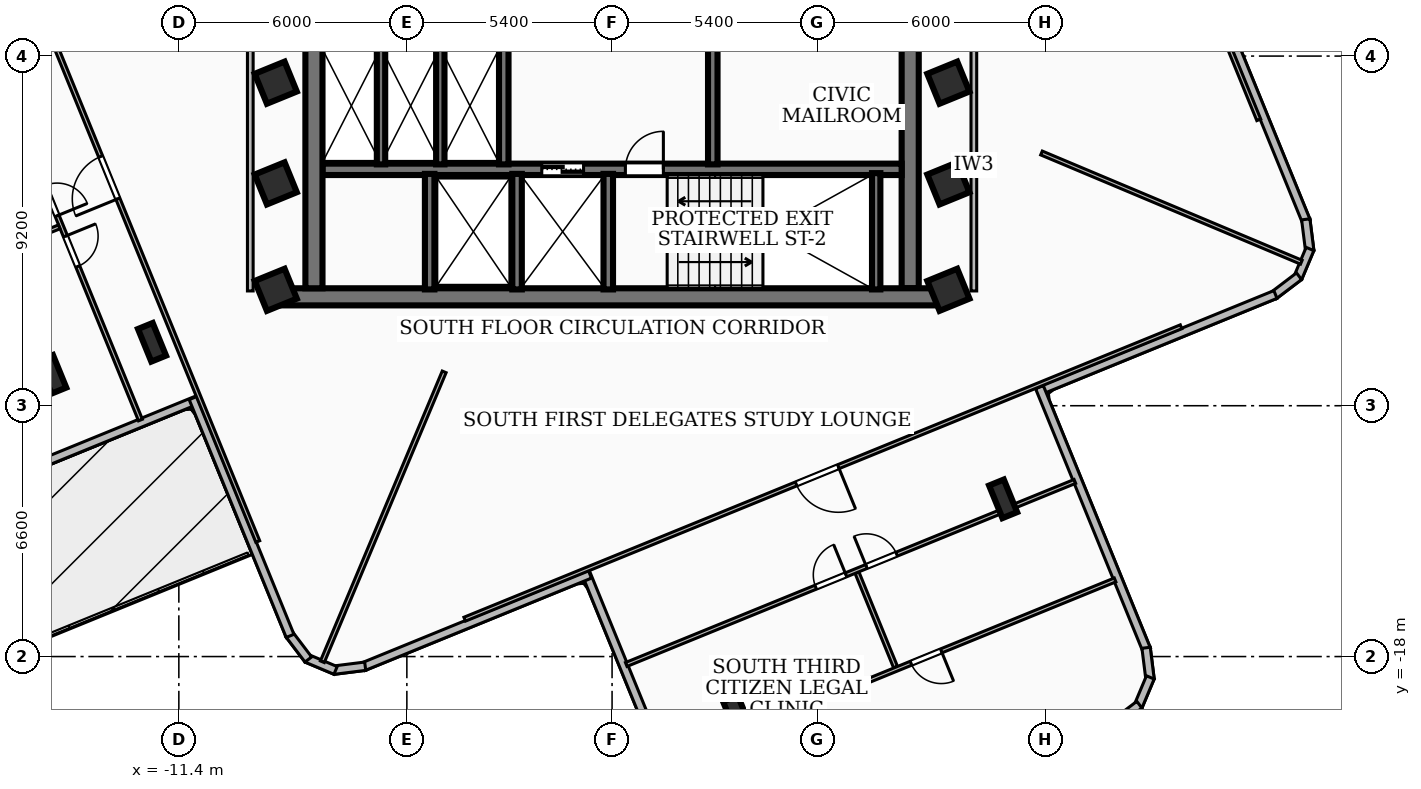
"""IFC4 building model, lengths in metres.
Left out: names, types, materials, properties, quantities, classifications, styles, units other than length and angle.
Written with IfcOpenShell. Run it as: python <this file> out.ifc"""

import sys

from ifc_helpers import new_model, si_unit, direction, frame, frame_2d, origin, origin_2d, place, context, subcontext, project, spatial, rectangle, i_section, extrude, element, fill, save


model = new_model("IFC4")
c1 = context("Model", 3, precision=1e-05, world=origin(), true_north=direction((0.0, 1.0)))
c2 = subcontext(c1, "Body", "Model", "MODEL_VIEW")
j1 = project(units=[si_unit("LENGTHUNIT", "METRE"), si_unit("PLANEANGLEUNIT", "RADIAN")], contexts=[c1])
p1 = place(None, origin())
s1 = spatial("IfcSite", under=j1, at=p1, CompositionType="ELEMENT")
p2 = place(p1, origin())
s2 = spatial("IfcBuilding", under=s1, at=p2, CompositionType="ELEMENT")
p3 = place(p2, frame((0.0, 0.0, 173.88)))
s3 = spatial("IfcBuildingStorey", under=s2, at=p3, CompositionType="ELEMENT", Elevation=173.88)
p4 = place(p3, frame((8.78, -8.535, 0.0), z_axis=(0.0, 0.0, 1.0), x_axis=(-1.0, 0.0, 0.0)))
e1 = element("IfcWall", 1, at=p4, inside=s3, PredefinedType="SHEAR", context=c2, shape_type="SweptSolid", body=[
    extrude(rectangle(XDim=17.56, YDim=0.45, at=frame_2d((8.78, 0.0))), origin(), (0.0, 0.0, 1.0), 3.34),
])
for number, where, z_axis, x_axis in (
    (2, (-7.845, -8.31, 0.0), (0.0, 0.0, 1.0), (0.0, 1.0, 0.0)),
    (3, (7.845, -1.975, 0.0), (0.0, 0.0, 1.0), (0.0, -1.0, 0.0)),
):
    element("IfcWall", number, at=place(p3, frame(where, z_axis=z_axis, x_axis=x_axis)), inside=s3, PredefinedType="SHEAR", context=c2, shape_type="SweptSolid", body=[
        extrude(rectangle(XDim=6.335, YDim=0.45, at=frame_2d((3.167, 0.0))), origin(), (0.0, 0.0, 1.0), 3.34),
    ])
p5 = place(p3, frame((-7.62, -5.18, 0.0), z_axis=(0.0, 0.0, 1.0), x_axis=(1.0, 0.0, 0.0)))
e4 = element("IfcWall", 4, at=p5, inside=s3, PredefinedType="SOLIDWALL", context=c2, shape_type="SweptSolid", body=[
    extrude(rectangle(XDim=15.24, YDim=0.3, at=frame_2d((7.62, 0.0))), origin(), (0.0, 0.0, 1.0), 3.34),
])
p6 = place(p5, frame((5.77, 0.0, 0.0)))
e5 = element("IfcOpeningElement", 5, at=p6, cuts=e4, PredefinedType="OPENING", context=c2, shape_type="SweptSolid", body=[
    extrude(rectangle(XDim=1.1, YDim=2.15, at=frame_2d((0.55, 1.075))), frame((0.0, 0.16, 0.0), z_axis=(0.0, -1.0, 0.0), x_axis=(1.0, 0.0, 0.0)), (0.0, 0.0, 1.0), 0.32),
])
p7 = place(p5, frame((7.97, 0.0, 0.0)))
e6 = element("IfcOpeningElement", 6, at=p7, cuts=e4, PredefinedType="OPENING", context=c2, shape_type="SweptSolid", body=[
    extrude(rectangle(XDim=1.0, YDim=2.1, at=frame_2d((0.5, 1.05))), frame((0.0, 0.16, 0.0), z_axis=(0.0, -1.0, 0.0), x_axis=(1.0, 0.0, 0.0)), (0.0, 0.0, 1.0), 0.32),
])
p8 = place(p3, frame((6.95, -8.34, 0.0), z_axis=(0.0, 0.0, 1.0), x_axis=(0.0, 1.0, 0.0)))
e7 = element("IfcWall", 7, at=p8, inside=s3, PredefinedType="SOLIDWALL", context=c2, shape_type="SweptSolid", body=[
    extrude(rectangle(XDim=3.06, YDim=0.22, at=frame_2d((1.53, 0.0))), origin(), (0.0, 0.0, 1.0), 3.34),
])
for number, where, z_axis, x_axis in (
    (8, (-0.1, -8.34, 0.0), (0.0, 0.0, 1.0), (0.0, 1.0, 0.0)),
    (9, (-2.5, -8.34, 0.0), (0.0, 0.0, 1.0), (0.0, 1.0, 0.0)),
    (10, (-4.8, -8.34, 0.0), (0.0, 0.0, 1.0), (0.0, 1.0, 0.0)),
):
    element("IfcWall", number, at=place(p3, frame(where, z_axis=z_axis, x_axis=x_axis)), inside=s3, PredefinedType="SOLIDWALL", context=c2, shape_type="SweptSolid", body=[
        extrude(rectangle(XDim=3.04, YDim=0.25, at=frame_2d((1.52, 0.0))), origin(), (0.0, 0.0, 1.0), 3.34),
    ])
for number, where, z_axis, x_axis in (
    (11, (-2.85, -5.05, 0.0), (0.0, 0.0, 1.0), (0.0, 1.0, 0.0)),
    (12, (2.65, -5.05, 0.0), (0.0, 0.0, 1.0), (0.0, 1.0, 0.0)),
):
    element("IfcWall", number, at=place(p3, frame(where, z_axis=z_axis, x_axis=x_axis)), inside=s3, PredefinedType="SOLIDWALL", context=c2, shape_type="SweptSolid", body=[
        extrude(rectangle(XDim=3.07, YDim=0.25, at=frame_2d((1.535, 0.0))), origin(), (0.0, 0.0, 1.0), 3.34),
    ])
for number, where, z_axis, x_axis in (
    (13, (-6.08, -5.05, 0.0), (0.0, 0.0, 1.0), (0.0, 1.0, 0.0)),
    (14, (-4.52, -5.05, 0.0), (0.0, 0.0, 1.0), (0.0, 1.0, 0.0)),
):
    element("IfcWall", number, at=place(p3, frame(where, z_axis=z_axis, x_axis=x_axis)), inside=s3, PredefinedType="SOLIDWALL", context=c2, shape_type="SweptSolid", body=[
        extrude(rectangle(XDim=3.07, YDim=0.22, at=frame_2d((1.535, 0.0))), origin(), (0.0, 0.0, 1.0), 3.34),
    ])
for number, where, z_axis, x_axis in (
    (15, (-8.85, -5.55, 0.0), (0.0, 0.0, 1.0), (0.926, 0.378, 0.0)),
    (16, (-8.85, -2.9, 0.0), (0.0, 0.0, 1.0), (0.926, 0.378, 0.0)),
    (17, (8.85, -5.55, 0.0), (0.0, 0.0, 1.0), (0.926, 0.378, 0.0)),
    (18, (8.85, -2.9, 0.0), (0.0, 0.0, 1.0), (0.926, 0.378, 0.0)),
    (19, (8.85, -8.35, 0.0), (0.0, 0.0, 1.0), (0.926, 0.378, 0.0)),
    (20, (-8.85, -8.35, 0.0), (0.0, 0.0, 1.0), (0.926, 0.378, 0.0)),
):
    element("IfcColumn", number, at=place(p3, frame(where, z_axis=z_axis, x_axis=x_axis)), inside=s3, PredefinedType="COLUMN", context=c2, shape_type="SweptSolid", body=[
        extrude(rectangle(XDim=0.85, YDim=0.85, at=origin_2d()), origin(), (0.0, 0.0, 1.0), 3.6),
    ])
for number, where, z_axis, x_axis in (
    (21, (-12.106, -9.731, 0.0), (0.0, 0.0, 1.0), (0.926, 0.378, 0.0)),
    (22, (-14.731, -10.573, 0.0), (0.0, 0.0, 1.0), (0.926, 0.378, 0.0)),
    (23, (3.29, -19.536, 0.0), (0.0, 0.0, 1.0), (0.926, 0.378, 0.0)),
    (24, (10.29, -13.85, 0.0), (0.0, 0.0, 1.0), (0.926, 0.378, 0.0)),
):
    element("IfcColumn", number, at=place(p3, frame(where, z_axis=z_axis, x_axis=x_axis)), inside=s3, PredefinedType="COLUMN", context=c2, shape_type="SweptSolid", body=[
        extrude(i_section(OverallWidth=0.418, OverallDepth=0.927, WebThickness=0.019, FlangeThickness=0.032, at=origin_2d()), origin(), (0.0, 0.0, 1.0), 3.6),
    ])
p9 = place(p3, frame((-10.912, -11.246, 0.0), z_axis=(0.0, 0.0, 1.0), x_axis=(-0.925847643695, -0.377896997427, 0.0)))
e25 = element("IfcWall", 25, at=p9, inside=s3, PredefinedType="SOLIDWALL", context=c2, shape_type="SweptSolid", body=[
    extrude(rectangle(XDim=9.058, YDim=0.22, at=frame_2d((4.529, 0.0))), origin(), (0.0, 0.0, 1.0), 2.72),
])
p10 = place(p9, frame((4.4, 0.0, 0.0)))
e26 = element("IfcOpeningElement", 26, at=p10, cuts=e25, PredefinedType="OPENING", context=c2, shape_type="SweptSolid", body=[
    extrude(rectangle(XDim=1.1, YDim=2.1, at=frame_2d((0.55, 1.05))), frame((0.0, 0.12, 0.0), z_axis=(0.0, -1.0, 0.0), x_axis=(1.0, 0.0, 0.0)), (0.0, 0.0, 1.0), 0.24),
])
p11 = place(p3, frame((15.834, -0.583, 0.0), z_axis=(0.0, 0.0, 1.0), x_axis=(0.377776256629, -0.925896916469, 0.0)))
e27 = element("IfcWall", 27, at=p11, inside=s3, PredefinedType="SOLIDWALL", context=c2, shape_type="SweptSolid", body=[
    extrude(rectangle(XDim=6.438, YDim=0.22, at=frame_2d((3.219, 0.0))), origin(), (0.0, 0.0, 1.0), 3.34),
])
p12 = place(p3, frame((18.254, -6.496, 0.0), z_axis=(0.0, 0.0, 1.0), x_axis=(0.124646916858, -0.992201162123, 0.0)))
e28 = element("IfcWall", 28, at=p12, inside=s3, PredefinedType="SOLIDWALL", context=c2, shape_type="SweptSolid", body=[
    extrude(rectangle(XDim=0.834, YDim=0.22, at=frame_2d((0.417, 0.0))), origin(), (0.0, 0.0, 1.0), 3.34),
])
p13 = place(p3, frame((18.365, -7.276, 0.0), z_axis=(0.0, 0.0, 1.0), x_axis=(-0.387977068381, -0.9216690265, 0.0)))
e29 = element("IfcWall", 29, at=p13, inside=s3, PredefinedType="SOLIDWALL", context=c2, shape_type="SweptSolid", body=[
    extrude(rectangle(XDim=0.819, YDim=0.22, at=frame_2d((0.41, 0.0))), origin(), (0.0, 0.0, 1.0), 3.34),
])
p14 = place(p3, frame((18.077, -7.993, 0.0), z_axis=(0.0, 0.0, 1.0), x_axis=(-0.796365329878, -0.604815890473, 0.0)))
e30 = element("IfcWall", 30, at=p14, inside=s3, PredefinedType="SOLIDWALL", context=c2, shape_type="SweptSolid", body=[
    extrude(rectangle(XDim=0.833, YDim=0.22, at=frame_2d((0.417, 0.0))), origin(), (0.0, 0.0, 1.0), 3.34),
])
p15 = place(p3, frame((17.456, -8.473, 0.0), z_axis=(0.0, 0.0, 1.0), x_axis=(-0.925916493636, -0.377728271133, 0.0)))
e31 = element("IfcWall", 31, at=p15, inside=s3, PredefinedType="SOLIDWALL", context=c2, shape_type="SweptSolid", body=[
    extrude(rectangle(XDim=6.759, YDim=0.22, at=frame_2d((3.379, 0.0))), origin(), (0.0, 0.0, 1.0), 3.34),
])
p16 = place(p3, frame((11.246, -10.912, 0.0), z_axis=(0.0, 0.0, 1.0), x_axis=(0.377850036169, -0.925866810166, 0.0)))
e32 = element("IfcWall", 32, at=p16, inside=s3, PredefinedType="SOLIDWALL", context=c2, shape_type="SweptSolid", body=[
    extrude(rectangle(XDim=7.458, YDim=0.22, at=frame_2d((3.729, 0.0))), origin(), (0.0, 0.0, 1.0), 3.34),
])
p17 = place(p3, frame((14.052, -17.769, 0.0), z_axis=(0.0, 0.0, 1.0), x_axis=(0.124646916858, -0.992201162123, 0.0)))
e33 = element("IfcWall", 33, at=p17, inside=s3, PredefinedType="SOLIDWALL", context=c2, shape_type="SweptSolid", body=[
    extrude(rectangle(XDim=0.834, YDim=0.22, at=frame_2d((0.417, 0.0))), origin(), (0.0, 0.0, 1.0), 3.34),
])
p18 = place(p3, frame((14.163, -18.549, 0.0), z_axis=(0.0, 0.0, 1.0), x_axis=(-0.388336782412, -0.92151752204, 0.0)))
e34 = element("IfcWall", 34, at=p18, inside=s3, PredefinedType="SOLIDWALL", context=c2, shape_type="SweptSolid", body=[
    extrude(rectangle(XDim=0.819, YDim=0.22, at=frame_2d((0.41, 0.0))), origin(), (0.0, 0.0, 1.0), 3.34),
])
p19 = place(p3, frame((13.875, -19.266, 0.0), z_axis=(0.0, 0.0, 1.0), x_axis=(-0.796613459657, -0.604489037034, 0.0)))
e35 = element("IfcWall", 35, at=p19, inside=s3, PredefinedType="SOLIDWALL", context=c2, shape_type="SweptSolid", body=[
    extrude(rectangle(XDim=0.833, YDim=0.22, at=frame_2d((0.417, 0.0))), origin(), (0.0, 0.0, 1.0), 3.34),
])
p20 = place(p3, frame((2.12, -22.691, 0.0), z_axis=(0.0, 0.0, 1.0), x_axis=(-0.377754391584, 0.92590583735, 0.0)))
e36 = element("IfcWall", 36, at=p20, inside=s3, PredefinedType="SOLIDWALL", context=c2, shape_type="SweptSolid", body=[
    extrude(rectangle(XDim=7.458, YDim=0.22, at=frame_2d((3.729, 0.0))), origin(), (0.0, 0.0, 1.0), 2.644),
])
p21 = place(p3, frame((-0.583, -15.834, 0.0), z_axis=(0.0, 0.0, 1.0), x_axis=(-0.925896916469, -0.377776256629, 0.0)))
e37 = element("IfcWall", 37, at=p21, inside=s3, PredefinedType="SOLIDWALL", context=c2, shape_type="SweptSolid", body=[
    extrude(rectangle(XDim=6.438, YDim=0.22, at=frame_2d((3.219, 0.0))), origin(), (0.0, 0.0, 1.0), 2.644),
])
p22 = place(p3, frame((-6.496, -18.254, 0.0), z_axis=(0.0, 0.0, 1.0), x_axis=(-0.992201162123, -0.124646916858, 0.0)))
e38 = element("IfcWall", 38, at=p22, inside=s3, PredefinedType="SOLIDWALL", context=c2, shape_type="SweptSolid", body=[
    extrude(rectangle(XDim=0.834, YDim=0.22, at=frame_2d((0.417, 0.0))), origin(), (0.0, 0.0, 1.0), 3.34),
])
p23 = place(p3, frame((-7.276, -18.365, 0.0), z_axis=(0.0, 0.0, 1.0), x_axis=(-0.9216690265, 0.387977068381, 0.0)))
e39 = element("IfcWall", 39, at=p23, inside=s3, PredefinedType="SOLIDWALL", context=c2, shape_type="SweptSolid", body=[
    extrude(rectangle(XDim=0.819, YDim=0.22, at=frame_2d((0.41, 0.0))), origin(), (0.0, 0.0, 1.0), 3.34),
])
p24 = place(p3, frame((-7.993, -18.077, 0.0), z_axis=(0.0, 0.0, 1.0), x_axis=(-0.604815890473, 0.796365329878, 0.0)))
e40 = element("IfcWall", 40, at=p24, inside=s3, PredefinedType="SOLIDWALL", context=c2, shape_type="SweptSolid", body=[
    extrude(rectangle(XDim=0.833, YDim=0.22, at=frame_2d((0.417, 0.0))), origin(), (0.0, 0.0, 1.0), 3.34),
])
p25 = place(p3, frame((-8.473, -17.456, 0.0), z_axis=(0.0, 0.0, 1.0), x_axis=(-0.377728271133, 0.925916493636, 0.0)))
e41 = element("IfcWall", 41, at=p25, inside=s3, PredefinedType="SOLIDWALL", context=c2, shape_type="SweptSolid", body=[
    extrude(rectangle(XDim=6.759, YDim=0.22, at=frame_2d((3.379, 0.0))), origin(), (0.0, 0.0, 1.0), 2.72),
])
p26 = place(p3, frame((-9.52, -8.38, 0.0), z_axis=(0.0, 0.0, 1.0), x_axis=(0.0, 1.0, 0.0)))
e42 = element("IfcWall", 42, at=p26, inside=s3, PredefinedType="PARTITIONING", context=c2, shape_type="SweptSolid", body=[
    extrude(rectangle(XDim=6.63, YDim=0.15, at=frame_2d((3.315, 0.0))), origin(), (0.0, 0.0, 1.0), 2.644),
])
p27 = place(p3, frame((9.52, -8.38, 0.0), z_axis=(0.0, 0.0, 1.0), x_axis=(0.0, 1.0, 0.0)))
e43 = element("IfcWall", 43, at=p27, inside=s3, PredefinedType="PARTITIONING", context=c2, shape_type="SweptSolid", body=[
    extrude(rectangle(XDim=6.63, YDim=0.15, at=frame_2d((3.315, 0.0))), origin(), (0.0, 0.0, 1.0), 3.34),
])
p28 = place(p3, frame((-4.418, -10.509, 0.0), z_axis=(0.0, 0.0, 1.0), x_axis=(-0.387471247296, -0.921881788799, 0.0)))
e44 = element("IfcWall", 44, at=p28, inside=s3, PredefinedType="PARTITIONING", context=c2, shape_type="SweptSolid", body=[
    extrude(rectangle(XDim=8.274, YDim=0.11, at=frame_2d((4.137, 0.0))), origin(), (0.0, 0.0, 1.0), 2.644),
])
p29 = place(p3, frame((11.3, -4.75, 0.0), z_axis=(0.0, 0.0, 1.0), x_axis=(0.92186077199, -0.387521247245, 0.0)))
e45 = element("IfcWall", 45, at=p29, inside=s3, PredefinedType="PARTITIONING", context=c2, shape_type="SweptSolid", body=[
    extrude(rectangle(XDim=7.417, YDim=0.11, at=frame_2d((3.708, 0.0))), origin(), (0.0, 0.0, 1.0), 3.34),
])
p30 = place(p3, frame((9.323, 14.973, 0.0), z_axis=(0.0, 0.0, 1.0), x_axis=(0.377891753295, -0.92584978414, 0.0)))
e46 = element("IfcWall", 46, at=p30, inside=s3, PredefinedType="PARTITIONING", context=c2, shape_type="SweptSolid", body=[
    extrude(rectangle(XDim=20.361, YDim=0.11, at=frame_2d((10.18, 0.0))), origin(), (0.0, 0.0, 1.0), 2.644),
])
p31 = place(p30, frame((9.741, 0.0, 0.0)))
e47 = element("IfcOpeningElement", 47, at=p31, cuts=e46, PredefinedType="OPENING", context=c2, shape_type="SweptSolid", body=[
    extrude(rectangle(XDim=1.2, YDim=2.1, at=frame_2d((0.6, 1.05))), frame((0.0, 0.065, 0.0), z_axis=(0.0, -1.0, 0.0), x_axis=(1.0, 0.0, 0.0)), (0.0, 0.0, 1.0), 0.13),
])
p32 = place(p3, frame((-9.323, -14.973, 0.0), z_axis=(0.0, 0.0, 1.0), x_axis=(-0.377891753295, 0.92584978414, 0.0)))
e48 = element("IfcWall", 48, at=p32, inside=s3, PredefinedType="PARTITIONING", context=c2, shape_type="SweptSolid", body=[
    extrude(rectangle(XDim=20.361, YDim=0.11, at=frame_2d((10.18, 0.0))), origin(), (0.0, 0.0, 1.0), 2.644),
])
p33 = place(p32, frame((9.741, 0.0, 0.0)))
e49 = element("IfcOpeningElement", 49, at=p33, cuts=e48, PredefinedType="OPENING", context=c2, shape_type="SweptSolid", body=[
    extrude(rectangle(XDim=1.2, YDim=2.1, at=frame_2d((0.6, 1.05))), frame((0.0, 0.065, 0.0), z_axis=(0.0, -1.0, 0.0), x_axis=(1.0, 0.0, 0.0)), (0.0, 0.0, 1.0), 0.13),
])
p34 = place(p3, frame((-14.549, -6.694, 0.0), z_axis=(0.0, 0.0, 1.0), x_axis=(-0.925908739044, -0.377747279226, 0.0)))
e50 = element("IfcWall", 50, at=p34, inside=s3, PredefinedType="PARTITIONING", context=c2, shape_type="SweptSolid", body=[
    extrude(rectangle(XDim=8.815, YDim=0.11, at=frame_2d((4.407, 0.0))), origin(), (0.0, 0.0, 1.0), 3.34),
])
p35 = place(p3, frame((-17.228, 0.028, 0.0), z_axis=(0.0, 0.0, 1.0), x_axis=(0.377875224856, -0.92585653016, 0.0)))
e51 = element("IfcWall", 51, at=p35, inside=s3, PredefinedType="PARTITIONING", context=c2, shape_type="SweptSolid", body=[
    extrude(rectangle(XDim=12.75, YDim=0.11, at=frame_2d((6.375, 0.0))), origin(), (0.0, 0.0, 1.0), 2.644),
])
p36 = place(p35, frame((6.085, 0.0, 0.0)))
e52 = element("IfcOpeningElement", 52, at=p36, cuts=e51, PredefinedType="OPENING", context=c2, shape_type="SweptSolid", body=[
    extrude(rectangle(XDim=0.86, YDim=2.04, at=frame_2d((0.43, 1.02))), frame((0.0, 0.065, 0.0), z_axis=(0.0, -1.0, 0.0), x_axis=(1.0, 0.0, 0.0)), (0.0, 0.0, 1.0), 0.13),
])
p37 = place(p35, frame((7.525, 0.0, 0.0)))
e53 = element("IfcOpeningElement", 53, at=p37, cuts=e51, PredefinedType="OPENING", context=c2, shape_type="SweptSolid", body=[
    extrude(rectangle(XDim=0.86, YDim=2.04, at=frame_2d((0.43, 1.02))), frame((0.0, 0.065, 0.0), z_axis=(0.0, -1.0, 0.0), x_axis=(1.0, 0.0, 0.0)), (0.0, 0.0, 1.0), 0.13),
])
p38 = place(p3, frame((14.973, -9.323, 0.0), z_axis=(0.0, 0.0, 1.0), x_axis=(-0.92584978414, -0.377891753295, 0.0)))
e54 = element("IfcWall", 54, at=p38, inside=s3, PredefinedType="PARTITIONING", context=c2, shape_type="SweptSolid", body=[
    extrude(rectangle(XDim=20.361, YDim=0.11, at=frame_2d((10.18, 0.0))), origin(), (0.0, 0.0, 1.0), 2.644),
])
p39 = place(p38, frame((9.741, 0.0, 0.0)))
e55 = element("IfcOpeningElement", 55, at=p39, cuts=e54, PredefinedType="OPENING", context=c2, shape_type="SweptSolid", body=[
    extrude(rectangle(XDim=1.2, YDim=2.1, at=frame_2d((0.6, 1.05))), frame((0.0, 0.065, 0.0), z_axis=(0.0, -1.0, 0.0), x_axis=(1.0, 0.0, 0.0)), (0.0, 0.0, 1.0), 0.13),
])
p40 = place(p3, frame((6.446, -15.795, 0.0), z_axis=(0.0, 0.0, 1.0), x_axis=(0.377834865886, -0.925873001076, 0.0)))
e56 = element("IfcWall", 56, at=p40, inside=s3, PredefinedType="PARTITIONING", context=c2, shape_type="SweptSolid", body=[
    extrude(rectangle(XDim=2.681, YDim=0.11, at=frame_2d((1.34, 0.0))), origin(), (0.0, 0.0, 1.0), 3.34),
])
p41 = place(p3, frame((0.373, -18.209, 0.0), z_axis=(0.0, 0.0, 1.0), x_axis=(0.925887289182, 0.377799851417, 0.0)))
e57 = element("IfcWall", 57, at=p41, inside=s3, PredefinedType="PARTITIONING", context=c2, shape_type="SweptSolid", body=[
    extrude(rectangle(XDim=12.75, YDim=0.11, at=frame_2d((6.375, 0.0))), origin(), (0.0, 0.0, 1.0), 2.644),
])
p42 = place(p41, frame((5.385, 0.0, 0.0)))
e58 = element("IfcOpeningElement", 58, at=p42, cuts=e57, PredefinedType="OPENING", context=c2, shape_type="SweptSolid", body=[
    extrude(rectangle(XDim=0.86, YDim=2.04, at=frame_2d((0.43, 1.02))), frame((0.0, 0.065, 0.0), z_axis=(0.0, -1.0, 0.0), x_axis=(1.0, 0.0, 0.0)), (0.0, 0.0, 1.0), 0.13),
])
p43 = place(p41, frame((6.825, 0.0, 0.0)))
e59 = element("IfcOpeningElement", 59, at=p43, cuts=e57, PredefinedType="OPENING", context=c2, shape_type="SweptSolid", body=[
    extrude(rectangle(XDim=0.86, YDim=2.04, at=frame_2d((0.43, 1.02))), frame((0.0, 0.065, 0.0), z_axis=(0.0, -1.0, 0.0), x_axis=(1.0, 0.0, 0.0)), (0.0, 0.0, 1.0), 0.13),
])
p44 = place(p3, frame((13.236, -15.984, 0.0), z_axis=(0.0, 0.0, 1.0), x_axis=(-0.92585653016, -0.377875224856, 0.0)))
e60 = element("IfcWall", 60, at=p44, inside=s3, PredefinedType="PARTITIONING", context=c2, shape_type="SweptSolid", body=[
    extrude(rectangle(XDim=12.75, YDim=0.11, at=frame_2d((6.375, 0.0))), origin(), (0.0, 0.0, 1.0), 3.34),
])
p45 = place(p44, frame((4.94, 0.0, 0.0)))
e61 = element("IfcOpeningElement", 61, at=p45, cuts=e60, PredefinedType="OPENING", context=c2, shape_type="SweptSolid", body=[
    extrude(rectangle(XDim=0.86, YDim=2.04, at=frame_2d((0.43, 1.02))), frame((0.0, 0.065, 0.0), z_axis=(0.0, -1.0, 0.0), x_axis=(1.0, 0.0, 0.0)), (0.0, 0.0, 1.0), 0.13),
])
p46 = place(p6, origin())
e62 = element("IfcDoor", 62, at=p46, inside=s3, OperationType="DOUBLE_DOOR_SLIDING", PredefinedType="DOOR", context=c2, shape_type="SweptSolid", body=[
    extrude(rectangle(XDim=1.1, YDim=2.15, at=frame_2d((0.55, 1.075))), frame((0.0, 0.025, 0.0), z_axis=(0.0, -1.0, 0.0), x_axis=(1.0, 0.0, 0.0)), (0.0, 0.0, 1.0), 0.05),
])
fill(e5, e62)
p47 = place(p7, origin())
e63 = element("IfcDoor", 63, at=p47, inside=s3, OperationType="SINGLE_SWING_RIGHT", PredefinedType="DOOR", context=c2, shape_type="SweptSolid", body=[
    extrude(rectangle(XDim=1.0, YDim=2.1, at=frame_2d((0.5, 1.05))), frame((0.0, 0.025, 0.0), z_axis=(0.0, -1.0, 0.0), x_axis=(1.0, 0.0, 0.0)), (0.0, 0.0, 1.0), 0.05),
])
fill(e6, e63)
p48 = place(p33, origin())
e64 = element("IfcDoor", 64, at=p48, inside=s3, OperationType="SINGLE_SWING_LEFT", PredefinedType="DOOR", context=c2, shape_type="SweptSolid", body=[
    extrude(rectangle(XDim=1.2, YDim=2.1, at=frame_2d((0.6, 1.05))), frame((0.0, 0.025, 0.0), z_axis=(0.0, -1.0, 0.0), x_axis=(1.0, 0.0, 0.0)), (0.0, 0.0, 1.0), 0.05),
])
fill(e49, e64)
p49 = place(p36, origin())
e65 = element("IfcDoor", 65, at=p49, inside=s3, OperationType="SINGLE_SWING_RIGHT", PredefinedType="DOOR", context=c2, shape_type="SweptSolid", body=[
    extrude(rectangle(XDim=0.86, YDim=2.04, at=frame_2d((0.43, 1.02))), frame((0.0, 0.025, 0.0), z_axis=(0.0, -1.0, 0.0), x_axis=(1.0, 0.0, 0.0)), (0.0, 0.0, 1.0), 0.05),
])
fill(e52, e65)
p50 = place(p37, origin())
e66 = element("IfcDoor", 66, at=p50, inside=s3, OperationType="SINGLE_SWING_LEFT", PredefinedType="DOOR", context=c2, shape_type="SweptSolid", body=[
    extrude(rectangle(XDim=0.86, YDim=2.04, at=frame_2d((0.43, 1.02))), frame((0.0, 0.025, 0.0), z_axis=(0.0, -1.0, 0.0), x_axis=(1.0, 0.0, 0.0)), (0.0, 0.0, 1.0), 0.05),
])
fill(e53, e66)
p51 = place(p39, origin())
e67 = element("IfcDoor", 67, at=p51, inside=s3, OperationType="SINGLE_SWING_LEFT", PredefinedType="DOOR", context=c2, shape_type="SweptSolid", body=[
    extrude(rectangle(XDim=1.2, YDim=2.1, at=frame_2d((0.6, 1.05))), frame((0.0, 0.025, 0.0), z_axis=(0.0, -1.0, 0.0), x_axis=(1.0, 0.0, 0.0)), (0.0, 0.0, 1.0), 0.05),
])
fill(e55, e67)
p52 = place(p42, origin())
e68 = element("IfcDoor", 68, at=p52, inside=s3, OperationType="SINGLE_SWING_RIGHT", PredefinedType="DOOR", context=c2, shape_type="SweptSolid", body=[
    extrude(rectangle(XDim=0.86, YDim=2.04, at=frame_2d((0.43, 1.02))), frame((0.0, 0.025, 0.0), z_axis=(0.0, -1.0, 0.0), x_axis=(1.0, 0.0, 0.0)), (0.0, 0.0, 1.0), 0.05),
])
fill(e58, e68)
p53 = place(p43, origin())
e69 = element("IfcDoor", 69, at=p53, inside=s3, OperationType="SINGLE_SWING_LEFT", PredefinedType="DOOR", context=c2, shape_type="SweptSolid", body=[
    extrude(rectangle(XDim=0.86, YDim=2.04, at=frame_2d((0.43, 1.02))), frame((0.0, 0.025, 0.0), z_axis=(0.0, -1.0, 0.0), x_axis=(1.0, 0.0, 0.0)), (0.0, 0.0, 1.0), 0.05),
])
fill(e59, e69)
p54 = place(p45, origin())
e70 = element("IfcDoor", 70, at=p54, inside=s3, OperationType="SINGLE_SWING_LEFT", PredefinedType="DOOR", context=c2, shape_type="SweptSolid", body=[
    extrude(rectangle(XDim=0.86, YDim=2.04, at=frame_2d((0.43, 1.02))), frame((0.0, 0.025, 0.0), z_axis=(0.0, -1.0, 0.0), x_axis=(1.0, 0.0, 0.0)), (0.0, 0.0, 1.0), 0.05),
])
fill(e61, e70)
save(model, sys.argv[1])
